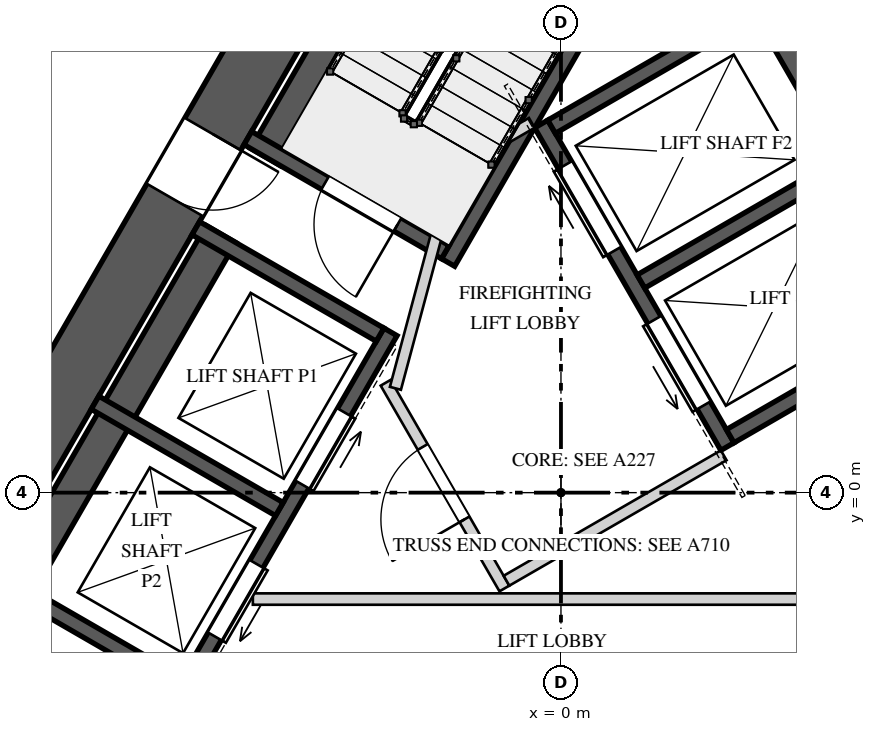
"""IFC4 building model, lengths in metres.
Left out: names, types, materials, properties, quantities, classifications, styles, units other than length and angle.
Written with IfcOpenShell. Run it as: python <this file> out.ifc"""

import sys

from ifc_helpers import new_model, si_unit, direction, frame, frame_2d, origin, place, context, subcontext, project, spatial, rectangle, extrude, element, fill, save


model = new_model("IFC4")
c1 = context("Model", 3, precision=1e-05, world=origin(), true_north=direction((0.0, 1.0)))
c2 = subcontext(c1, "Body", "Model", "MODEL_VIEW")
j1 = project(units=[si_unit("LENGTHUNIT", "METRE"), si_unit("PLANEANGLEUNIT", "RADIAN")], contexts=[c1])
p1 = place(None, origin())
s1 = spatial("IfcSite", under=j1, at=p1, CompositionType="ELEMENT")
p2 = place(p1, origin())
s2 = spatial("IfcBuilding", under=s1, at=p2, CompositionType="ELEMENT")
p3 = place(p2, frame((0.0, 0.0, 194.8)))
s3 = spatial("IfcBuildingStorey", under=s2, at=p3, CompositionType="ELEMENT", Elevation=194.8)
p4 = place(p3, frame((-1.198, 10.575, 0.0), z_axis=(0.0, 0.0, 1.0), x_axis=(-0.499995289315, -0.866028123483, 0.0)))
e1 = element("IfcWall", 1, at=p4, inside=s3, PredefinedType="SHEAR", context=c2, shape_type="SweptSolid", body=[
    extrude(rectangle(XDim=17.118, YDim=0.85, at=frame_2d((8.559, 0.0))), origin(), (0.0, 0.0, 1.0), 5.2),
])
p5 = place(p4, frame((6.764, 0.0, 0.0)))
e2 = element("IfcOpeningElement", 2, at=p5, cuts=e1, PredefinedType="OPENING", context=c2, shape_type="SweptSolid", body=[
    extrude(rectangle(XDim=1.0, YDim=2.4, at=frame_2d((0.5, 1.2))), frame((0.0, 0.435, 0.0), z_axis=(0.0, -1.0, 0.0), x_axis=(1.0, 0.0, 0.0)), (0.0, 0.0, 1.0), 0.87),
])
p6 = place(p3, frame((9.757, -4.25, 0.0), z_axis=(0.0, 0.0, 1.0), x_axis=(-0.499995289315, 0.866028123483, 0.0)))
e3 = element("IfcWall", 3, at=p6, inside=s3, PredefinedType="SHEAR", context=c2, shape_type="SweptSolid", body=[
    extrude(rectangle(XDim=17.118, YDim=0.85, at=frame_2d((8.559, 0.0))), origin(), (0.0, 0.0, 1.0), 5.2),
])
p7 = place(p6, frame((6.834, 0.0, 0.0)))
e4 = element("IfcOpeningElement", 4, at=p7, cuts=e3, PredefinedType="OPENING", context=c2, shape_type="SweptSolid", body=[
    extrude(rectangle(XDim=1.0, YDim=2.4, at=frame_2d((0.5, 1.2))), frame((0.0, 0.435, 0.0), z_axis=(0.0, -1.0, 0.0), x_axis=(1.0, 0.0, 0.0)), (0.0, 0.0, 1.0), 0.87),
])
p8 = place(p6, frame((14.252, 0.0, 0.0)))
e5 = element("IfcOpeningElement", 5, at=p8, cuts=e3, PredefinedType="OPENING", context=c2, shape_type="SweptSolid", body=[
    extrude(rectangle(XDim=0.8, YDim=2.1, at=frame_2d((0.4, 1.05))), frame((0.0, 0.435, 0.0), z_axis=(0.0, -1.0, 0.0), x_axis=(1.0, 0.0, 0.0)), (0.0, 0.0, 1.0), 0.87),
])
p9 = place(p3, frame((-0.788, 9.785, 0.0), z_axis=(0.0, 0.0, 1.0), x_axis=(-0.500009909098, -0.866019682689, 0.0)))
e6 = element("IfcWall", 6, at=p9, inside=s3, PredefinedType="SOLIDWALL", context=c2, shape_type="SweptSolid", body=[
    extrude(rectangle(XDim=6.2, YDim=0.45, at=frame_2d((3.1, 0.0))), origin(), (0.0, 0.0, 1.0), 4.85),
])
p10 = place(p3, frame((1.79, 8.7, 0.0), z_axis=(0.0, 0.0, 1.0), x_axis=(-0.499999959354, -0.866025427251, 0.0)))
e7 = element("IfcWall", 7, at=p10, inside=s3, PredefinedType="SOLIDWALL", context=c2, shape_type="SweptSolid", body=[
    extrude(rectangle(XDim=6.549, YDim=0.2, at=frame_2d((3.275, 0.0))), origin(), (0.0, 0.0, 1.0), 4.85),
])
p11 = place(p3, frame((-1.521, 3.165, 0.0), z_axis=(0.0, 0.0, 1.0), x_axis=(-0.866031096941, 0.499990139034, 0.0)))
e8 = element("IfcWall", 8, at=p11, inside=s3, PredefinedType="SOLIDWALL", context=c2, shape_type="SweptSolid", body=[
    extrude(rectangle(XDim=3.0, YDim=0.2, at=frame_2d((1.5, 0.0))), origin(), (0.0, 0.0, 1.0), 4.85),
])
p12 = place(p11, frame((0.725, 0.0, 0.0)))
e9 = element("IfcOpeningElement", 9, at=p12, cuts=e8, PredefinedType="OPENING", context=c2, shape_type="SweptSolid", body=[
    extrude(rectangle(XDim=1.1, YDim=2.4, at=frame_2d((0.55, 1.2))), frame((0.0, 0.11, 0.0), z_axis=(0.0, -1.0, 0.0), x_axis=(1.0, 0.0, 0.0)), (0.0, 0.0, 1.0), 0.22),
])
p13 = place(p3, frame((-2.243, 2.115, 0.0), z_axis=(0.0, 0.0, 1.0), x_axis=(-0.499996545922, -0.866027397988, 0.0)))
e10 = element("IfcWall", 10, at=p13, inside=s3, PredefinedType="SOLIDWALL", context=c2, shape_type="SweptSolid", body=[
    extrude(rectangle(XDim=5.5, YDim=0.2, at=frame_2d((2.75, 0.0))), origin(), (0.0, 0.0, 1.0), 4.85),
])
p14 = place(p13, frame((1.22, 0.0, 0.0)))
e11 = element("IfcOpeningElement", 11, at=p14, cuts=e10, PredefinedType="OPENING", context=c2, shape_type="SweptSolid", body=[
    extrude(rectangle(XDim=1.1, YDim=2.1, at=frame_2d((0.55, 1.05))), frame((0.0, 0.11, 0.0), z_axis=(0.0, -1.0, 0.0), x_axis=(1.0, 0.0, 0.0)), (0.0, 0.0, 1.0), 0.22),
])
p15 = place(p13, frame((3.525, 0.0, 0.0)))
e12 = element("IfcOpeningElement", 12, at=p15, cuts=e10, PredefinedType="OPENING", context=c2, shape_type="SweptSolid", body=[
    extrude(rectangle(XDim=1.1, YDim=2.1, at=frame_2d((0.55, 1.05))), frame((0.0, 0.11, 0.0), z_axis=(0.0, -1.0, 0.0), x_axis=(1.0, 0.0, 0.0)), (0.0, 0.0, 1.0), 0.22),
])
p16 = place(p3, frame((-4.473, 3.402, 0.0), z_axis=(0.0, 0.0, 1.0), x_axis=(-0.499996545922, -0.866027397988, 0.0)))
e13 = element("IfcWall", 13, at=p16, inside=s3, PredefinedType="SOLIDWALL", context=c2, shape_type="SweptSolid", body=[
    extrude(rectangle(XDim=5.5, YDim=0.45, at=frame_2d((2.75, 0.0))), origin(), (0.0, 0.0, 1.0), 4.85),
])
p17 = place(p3, frame((-2.38, 2.078, 0.0), z_axis=(0.0, 0.0, 1.0), x_axis=(-0.866034573852, 0.49998411664, 0.0)))
e14 = element("IfcWall", 14, at=p17, inside=s3, PredefinedType="SOLIDWALL", context=c2, shape_type="SweptSolid", body=[
    extrude(rectangle(XDim=2.8, YDim=0.2, at=frame_2d((1.4, 0.0))), origin(), (0.0, 0.0, 1.0), 4.85),
])
p18 = place(p3, frame((-3.705, -0.217, 0.0), z_axis=(0.0, 0.0, 1.0), x_axis=(-0.866018616679, 0.500011755427, 0.0)))
e15 = element("IfcWall", 15, at=p18, inside=s3, PredefinedType="SOLIDWALL", context=c2, shape_type="SweptSolid", body=[
    extrude(rectangle(XDim=2.8, YDim=0.2, at=frame_2d((1.4, 0.0))), origin(), (0.0, 0.0, 1.0), 4.85),
])
p19 = place(p3, frame((-5.03, -2.512, 0.0), z_axis=(0.0, 0.0, 1.0), x_axis=(-0.865996816683, 0.500049511043, 0.0)))
e16 = element("IfcWall", 16, at=p19, inside=s3, PredefinedType="SOLIDWALL", context=c2, shape_type="SweptSolid", body=[
    extrude(rectangle(XDim=2.8, YDim=0.2, at=frame_2d((1.4, 0.0))), origin(), (0.0, 0.0, 1.0), 4.85),
])
p20 = place(p3, frame((2.19, 0.606, 0.0), z_axis=(0.0, 0.0, 1.0), x_axis=(-0.500002801628, 0.866023786258, 0.0)))
e17 = element("IfcWall", 17, at=p20, inside=s3, PredefinedType="SOLIDWALL", context=c2, shape_type="SweptSolid", body=[
    extrude(rectangle(XDim=4.9, YDim=0.2, at=frame_2d((2.45, 0.0))), origin(), (0.0, 0.0, 1.0), 4.85),
])
p21 = place(p20, frame((0.625, 0.0, 0.0)))
e18 = element("IfcOpeningElement", 18, at=p21, cuts=e17, PredefinedType="OPENING", context=c2, shape_type="SweptSolid", body=[
    extrude(rectangle(XDim=1.3, YDim=2.1, at=frame_2d((0.65, 1.05))), frame((0.0, 0.11, 0.0), z_axis=(0.0, -1.0, 0.0), x_axis=(1.0, 0.0, 0.0)), (0.0, 0.0, 1.0), 0.22),
])
p22 = place(p20, frame((2.975, 0.0, 0.0)))
e19 = element("IfcOpeningElement", 19, at=p22, cuts=e17, PredefinedType="OPENING", context=c2, shape_type="SweptSolid", body=[
    extrude(rectangle(XDim=1.3, YDim=2.1, at=frame_2d((0.65, 1.05))), frame((0.0, 0.11, 0.0), z_axis=(0.0, -1.0, 0.0), x_axis=(1.0, 0.0, 0.0)), (0.0, 0.0, 1.0), 0.22),
])
p23 = place(p3, frame((5.113, 2.294, 0.0), z_axis=(0.0, 0.0, 1.0), x_axis=(-0.500002801628, 0.866023786258, 0.0)))
e20 = element("IfcWall", 20, at=p23, inside=s3, PredefinedType="SOLIDWALL", context=c2, shape_type="SweptSolid", body=[
    extrude(rectangle(XDim=4.9, YDim=0.45, at=frame_2d((2.45, 0.0))), origin(), (0.0, 0.0, 1.0), 4.85),
])
for number, where, z_axis, x_axis in (
    (21, (2.227, 0.743, 0.0), (0.0, 0.0, 1.0), (0.866, 0.5, 0.0)),
    (22, (1.052, 2.778, 0.0), (0.0, 0.0, 1.0), (0.866, 0.5, 0.0)),
    (23, (-0.123, 4.813, 0.0), (0.0, 0.0, 1.0), (0.866, 0.5, 0.0)),
):
    element("IfcWall", number, at=place(p3, frame(where, z_axis=z_axis, x_axis=x_axis)), inside=s3, PredefinedType="SOLIDWALL", context=c2, shape_type="SweptSolid", body=[
        extrude(rectangle(XDim=3.6, YDim=0.2, at=frame_2d((1.8, 0.0))), origin(), (0.0, 0.0, 1.0), 4.85),
    ])
p24 = place(p3, frame((-0.744, -1.261, 0.0), z_axis=(0.0, 0.0, 1.0), x_axis=(-0.500004234368, 0.866022959057, 0.0)))
e24 = element("IfcWall", 24, at=p24, inside=s3, PredefinedType="PARTITIONING", context=c2, shape_type="SweptSolid", body=[
    extrude(rectangle(XDim=3.125, YDim=0.15, at=frame_2d((1.562, 0.0))), origin(), (0.0, 0.0, 1.0), 4.85),
])
p25 = place(p24, frame((1.05, 0.0, 0.0)))
e25 = element("IfcOpeningElement", 25, at=p25, cuts=e24, PredefinedType="OPENING", context=c2, shape_type="SweptSolid", body=[
    extrude(rectangle(XDim=1.1, YDim=2.4, at=frame_2d((0.55, 1.2))), frame((0.0, 0.085, 0.0), z_axis=(0.0, -1.0, 0.0), x_axis=(1.0, 0.0, 0.0)), (0.0, 0.0, 1.0), 0.17),
])
p26 = place(p3, frame((-0.717, -1.159, 0.0), z_axis=(0.0, 0.0, 1.0), x_axis=(0.866008176907, 0.50002983664, 0.0)))
e26 = element("IfcWall", 26, at=p26, inside=s3, PredefinedType="PARTITIONING", context=c2, shape_type="SweptSolid", body=[
    extrude(rectangle(XDim=3.3, YDim=0.15, at=frame_2d((1.65, 0.0))), origin(), (0.0, 0.0, 1.0), 4.85),
])
p27 = place(p3, frame((-2.178, 1.372, 0.0), z_axis=(0.0, 0.0, 1.0), x_axis=(0.258808958833, 0.96592852884, 0.0)))
e27 = element("IfcWall", 27, at=p27, inside=s3, PredefinedType="PARTITIONING", context=c2, shape_type="SweptSolid", body=[
    extrude(rectangle(XDim=2.903, YDim=0.15, at=frame_2d((1.451, 0.0))), origin(), (0.0, 0.0, 1.0), 4.85),
])
p28 = place(p3, frame((-1.51, 4.215, 0.0), z_axis=(0.0, 0.0, 1.0), x_axis=(0.866085525409, 0.49989585183, 0.0)))
e28 = element("IfcWall", 28, at=p28, inside=s3, PredefinedType="PARTITIONING", context=c2, shape_type="SweptSolid", body=[
    extrude(rectangle(XDim=1.3, YDim=0.15, at=frame_2d((0.65, 0.0))), origin(), (0.0, 0.0, 1.0), 4.85),
])
p29 = place(p3, frame((-4.053, -1.4, 0.0), z_axis=(0.0, 0.0, 1.0), x_axis=(1.0, 0.0, 0.0)))
e29 = element("IfcWall", 29, at=p29, inside=s3, PredefinedType="PARTITIONING", context=c2, shape_type="SweptSolid", body=[
    extrude(rectangle(XDim=7.876, YDim=0.15, at=frame_2d((3.938, 0.0))), origin(), (0.0, 0.0, 1.0), 4.85),
])
p30 = place(p3, frame((-7.878, 4.854, 0.0), z_axis=(0.0, 0.0, 1.0), x_axis=(0.499997407846, 0.86602690036, 0.0)))
e30 = element("IfcWall", 30, at=p30, inside=s3, PredefinedType="SOLIDWALL", context=c2, shape_type="SweptSolid", body=[
    extrude(rectangle(XDim=4.791, YDim=0.2, at=frame_2d((2.396, 0.0))), origin(), (0.0, 0.0, 1.0), 4.85),
])
p31 = place(p12, origin())
e31 = element("IfcDoor", 31, at=p31, inside=s3, OperationType="SINGLE_SWING_RIGHT", PredefinedType="DOOR", context=c2, shape_type="SweptSolid", body=[
    extrude(rectangle(XDim=1.1, YDim=2.4, at=frame_2d((0.55, 1.2))), frame((0.0, 0.025, 0.0), z_axis=(0.0, -1.0, 0.0), x_axis=(1.0, 0.0, 0.0)), (0.0, 0.0, 1.0), 0.05),
])
fill(e9, e31)
p32 = place(p14, origin())
e32 = element("IfcDoor", 32, at=p32, inside=s3, OperationType="SLIDING_TO_LEFT", PredefinedType="DOOR", context=c2, shape_type="SweptSolid", body=[
    extrude(rectangle(XDim=1.1, YDim=2.1, at=frame_2d((0.55, 1.05))), frame((0.0, 0.025, 0.0), z_axis=(0.0, -1.0, 0.0), x_axis=(1.0, 0.0, 0.0)), (0.0, 0.0, 1.0), 0.05),
])
fill(e11, e32)
p33 = place(p15, origin())
e33 = element("IfcDoor", 33, at=p33, inside=s3, OperationType="SLIDING_TO_RIGHT", PredefinedType="DOOR", context=c2, shape_type="SweptSolid", body=[
    extrude(rectangle(XDim=1.1, YDim=2.1, at=frame_2d((0.55, 1.05))), frame((0.0, 0.025, 0.0), z_axis=(0.0, -1.0, 0.0), x_axis=(1.0, 0.0, 0.0)), (0.0, 0.0, 1.0), 0.05),
])
fill(e12, e33)
p34 = place(p21, origin())
e34 = element("IfcDoor", 34, at=p34, inside=s3, OperationType="SLIDING_TO_LEFT", PredefinedType="DOOR", context=c2, shape_type="SweptSolid", body=[
    extrude(rectangle(XDim=1.3, YDim=2.1, at=frame_2d((0.65, 1.05))), frame((0.0, 0.025, 0.0), z_axis=(0.0, -1.0, 0.0), x_axis=(1.0, 0.0, 0.0)), (0.0, 0.0, 1.0), 0.05),
])
fill(e18, e34)
p35 = place(p22, origin())
e35 = element("IfcDoor", 35, at=p35, inside=s3, OperationType="SLIDING_TO_RIGHT", PredefinedType="DOOR", context=c2, shape_type="SweptSolid", body=[
    extrude(rectangle(XDim=1.3, YDim=2.1, at=frame_2d((0.65, 1.05))), frame((0.0, 0.025, 0.0), z_axis=(0.0, -1.0, 0.0), x_axis=(1.0, 0.0, 0.0)), (0.0, 0.0, 1.0), 0.05),
])
fill(e19, e35)
p36 = place(p25, origin())
e36 = element("IfcDoor", 36, at=p36, inside=s3, OperationType="SINGLE_SWING_LEFT", PredefinedType="DOOR", context=c2, shape_type="SweptSolid", body=[
    extrude(rectangle(XDim=1.1, YDim=2.4, at=frame_2d((0.55, 1.2))), frame((0.0, 0.025, 0.0), z_axis=(0.0, -1.0, 0.0), x_axis=(1.0, 0.0, 0.0)), (0.0, 0.0, 1.0), 0.05),
])
fill(e25, e36)
p37 = place(p5, origin())
e37 = element("IfcDoor", 37, at=p37, inside=s3, OperationType="SINGLE_SWING_RIGHT", PredefinedType="DOOR", context=c2, shape_type="SweptSolid", body=[
    extrude(rectangle(XDim=1.0, YDim=2.4, at=frame_2d((0.5, 1.2))), frame((0.0, 0.025, 0.0), z_axis=(0.0, -1.0, 0.0), x_axis=(1.0, 0.0, 0.0)), (0.0, 0.0, 1.0), 0.05),
])
fill(e2, e37)
save(model, sys.argv[1])
